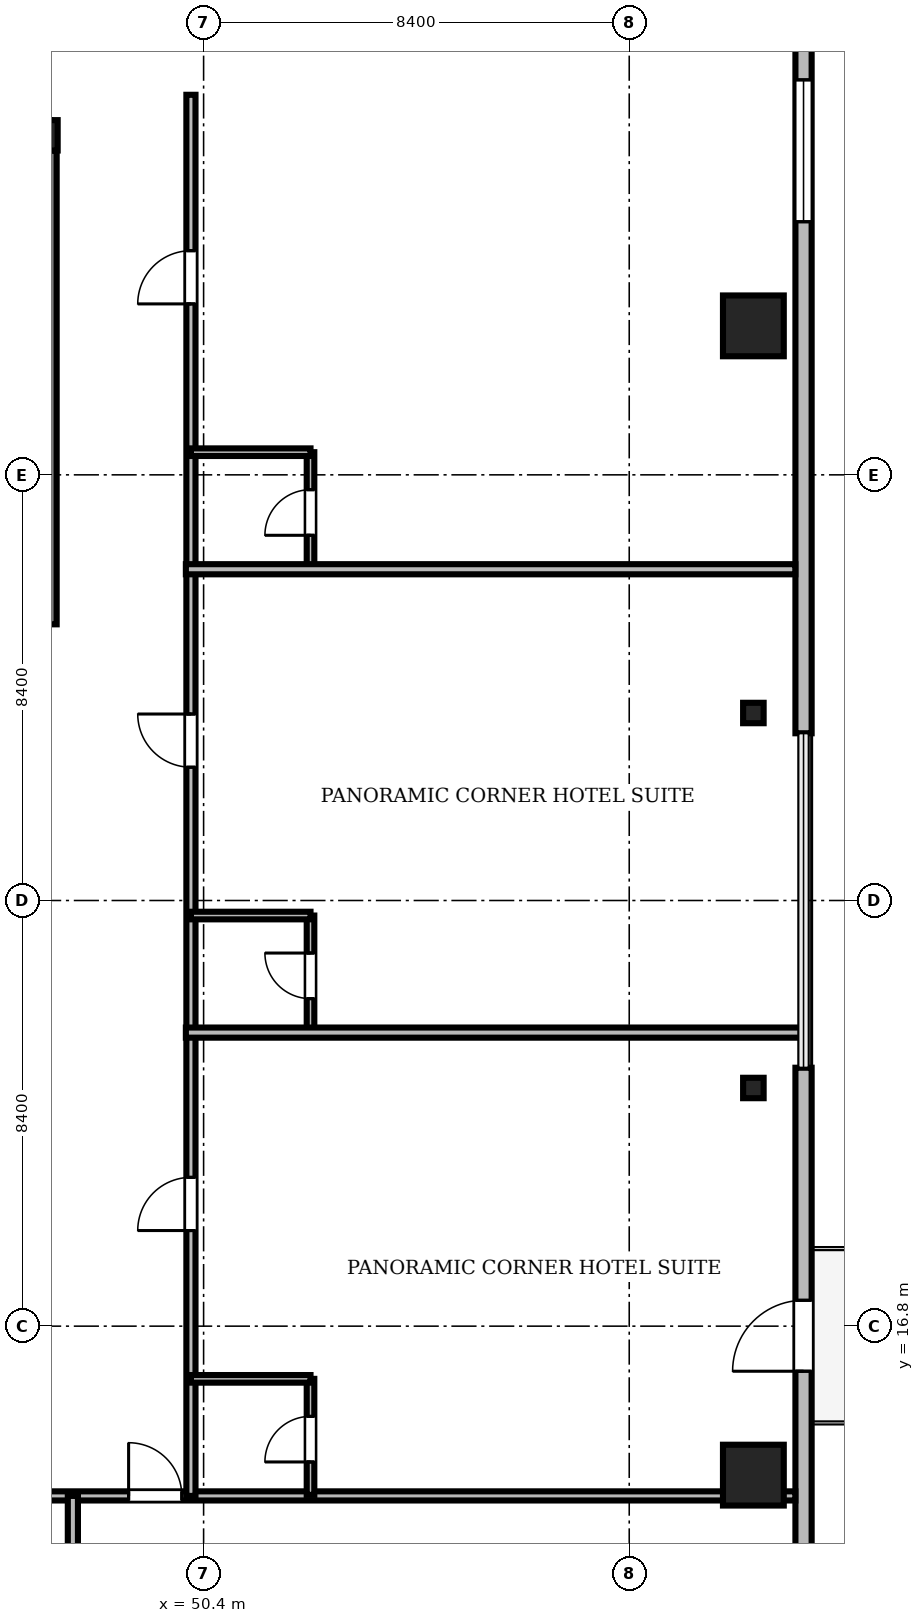
"""IFC4 building model, lengths in metres.
Left out: names, types, materials, properties, quantities, classifications, styles, units other than length and angle.
Written with IfcOpenShell. Run it as: python <this file> out.ifc"""

import sys

from ifc_helpers import new_model, si_unit, direction, frame, frame_2d, origin, origin_2d, place, context, subcontext, project, spatial, rectangle, i_section, extrude, source, transform, mapped, element, fill, save


model = new_model("IFC4")
c1 = context("Model", 3, precision=1e-05, world=origin(), true_north=direction((0.0, 1.0)))
c2 = subcontext(c1, "Body", "Model", "MODEL_VIEW")
j1 = project(units=[si_unit("LENGTHUNIT", "METRE"), si_unit("PLANEANGLEUNIT", "RADIAN")], contexts=[c1])
p1 = place(None, origin())
s1 = spatial("IfcSite", under=j1, at=p1, CompositionType="ELEMENT")
p2 = place(p1, origin())
s2 = spatial("IfcBuilding", under=s1, at=p2, CompositionType="ELEMENT")
p3 = place(p2, frame((0.0, 0.0, 242.7)))
s3 = spatial("IfcBuildingStorey", under=s2, at=p3, CompositionType="ELEMENT", Elevation=242.7)
m1 = source(origin(), c2, "Body", "SweptSolid", [
    extrude(i_section(OverallWidth=0.3, OverallDepth=0.6, WebThickness=0.015, FlangeThickness=0.03, FilletRadius=0.027, at=origin_2d()), origin(), (0.0, 0.0, 1.0), 3.73),
])
p4 = place(p3, frame((47.37, 40.3, 0.0), z_axis=(0.0, 0.0, 1.0), x_axis=(1.0, 0.0, 0.0)))
e1 = element("IfcColumn", 1, at=p4, inside=s3, PredefinedType="COLUMN", context=c2, shape_type="MappedRepresentation", body=[
    mapped(m1, transform((0.0, 0.0, 0.0), scale=1.0)),
])
m2 = source(origin(), c2, "Body", "SweptSolid", [
    extrude(rectangle(XDim=1.2, YDim=1.2, at=origin_2d()), origin(), (0.0, 0.0, 1.0), 3.73),
])
for number, where, z_axis, x_axis in (
    (2, (61.25, 13.86, 0.0), (0.0, 0.0, 1.0), (1.0, 0.0, 0.0)),
    (3, (61.25, 36.54, 0.0), (0.0, 0.0, 1.0), (1.0, 0.0, 0.0)),
):
    element("IfcColumn", number, at=place(p3, frame(where, z_axis=z_axis, x_axis=x_axis)), inside=s3, PredefinedType="COLUMN", context=c2, shape_type="MappedRepresentation", body=[
        mapped(m2, transform((0.0, 0.0, 0.0), scale=1.0)),
    ])
m3 = source(origin(), c2, "Body", "SweptSolid", [
    extrude(i_section(OverallWidth=0.405, OverallDepth=0.403, WebThickness=0.018, FlangeThickness=0.028, FilletRadius=0.015, at=origin_2d()), origin(), (0.0, 0.0, 1.0), 3.73),
])
for number, where, z_axis, x_axis in (
    (4, (61.25, 21.5, 0.0), (0.0, 0.0, 1.0), (1.0, 0.0, 0.0)),
    (5, (61.25, 28.9, 0.0), (0.0, 0.0, 1.0), (1.0, 0.0, 0.0)),
):
    element("IfcColumn", number, at=place(p3, frame(where, z_axis=z_axis, x_axis=x_axis)), inside=s3, PredefinedType="COLUMN", context=c2, shape_type="MappedRepresentation", body=[
        mapped(m3, transform((0.0, 0.0, 0.0), scale=1.0)),
    ])
m4 = source(origin(), c2, "Body", "SweptSolid", [
    extrude(rectangle(XDim=15.6, YDim=0.32, at=frame_2d((7.8, 0.0))), origin(), (0.0, 0.0, 1.0), 3.73),
])
p5 = place(p3, frame((62.24, 6.3, 0.0), z_axis=(0.0, 0.0, 1.0), x_axis=(0.0, 1.0, 0.0)))
e6 = element("IfcWall", 6, at=p5, inside=s3, PredefinedType="SOLIDWALL", context=c2, shape_type="MappedRepresentation", body=[
    mapped(m4, transform((0.0, 0.0, 0.0), scale=1.0)),
])
m5 = source(origin(), c2, "Body", "SweptSolid", [
    extrude(rectangle(XDim=1.4, YDim=2.3, at=frame_2d((0.7, 1.15))), frame((0.0, 0.17, 0.0), z_axis=(0.0, -1.0, 0.0), x_axis=(1.0, 0.0, 0.0)), (0.0, 0.0, 1.0), 0.34),
])
p6 = place(p5, frame((9.61, 0.0, 0.0)))
e7 = element("IfcOpeningElement", 7, at=p6, cuts=e6, PredefinedType="OPENING", context=c2, shape_type="MappedRepresentation", body=[
    mapped(m5, transform((0.0, 0.0, 0.0), scale=1.0)),
])
m6 = source(origin(), c2, "Body", "SweptSolid", [
    extrude(rectangle(XDim=2.8, YDim=2.4, at=frame_2d((1.4, 1.2))), frame((0.0, 0.17, 0.0), z_axis=(0.0, -1.0, 0.0), x_axis=(1.0, 0.0, 0.0)), (0.0, 0.0, 1.0), 0.34),
])
p7 = place(p5, frame((2.705, 0.0, 0.72)))
e8 = element("IfcOpeningElement", 8, at=p7, cuts=e6, PredefinedType="OPENING", context=c2, shape_type="MappedRepresentation", body=[
    mapped(m6, transform((0.0, 0.0, 0.0), scale=1.0)),
])
m7 = source(origin(), c2, "Body", "SweptSolid", [
    extrude(rectangle(XDim=15.6, YDim=0.32, at=frame_2d((7.8, 0.0))), origin(), (0.0, 0.0, 1.0), 3.73),
])
p8 = place(p3, frame((62.24, 28.5, 0.0), z_axis=(0.0, 0.0, 1.0), x_axis=(0.0, 1.0, 0.0)))
e9 = element("IfcWall", 9, at=p8, inside=s3, PredefinedType="SOLIDWALL", context=c2, shape_type="MappedRepresentation", body=[
    mapped(m7, transform((0.0, 0.0, 0.0), scale=1.0)),
])
p9 = place(p8, frame((10.095, 0.0, 0.72)))
e10 = element("IfcOpeningElement", 10, at=p9, cuts=e9, PredefinedType="OPENING", context=c2, shape_type="MappedRepresentation", body=[
    mapped(m6, transform((0.0, 0.0, 0.0), scale=1.0)),
])
m8 = source(origin(), c2, "Body", "SweptSolid", [
    extrude(rectangle(XDim=9.35, YDim=0.25, at=frame_2d((4.675, 0.0))), origin(), (0.0, 0.0, 1.0), 3.75),
])
p10 = place(p3, frame((47.375, 30.65, 0.0), z_axis=(0.0, 0.0, 1.0), x_axis=(0.0, 1.0, 0.0)))
e11 = element("IfcWall", 11, at=p10, inside=s3, PredefinedType="SOLIDWALL", context=c2, shape_type="MappedRepresentation", body=[
    mapped(m8, transform((0.0, 0.0, 0.0), scale=1.0)),
])
m9 = source(origin(), c2, "Body", "SweptSolid", [
    extrude(rectangle(XDim=46.156, YDim=0.18, at=frame_2d((23.078, 0.0))), origin(), (0.0, 0.0, 1.0), 2.972),
])
p11 = place(p3, frame((15.922, 13.45, 0.0), z_axis=(0.0, 0.0, 1.0), x_axis=(1.0, 0.0, 0.0)))
e12 = element("IfcWall", 12, at=p11, inside=s3, PredefinedType="PARTITIONING", context=c2, shape_type="MappedRepresentation", body=[
    mapped(m9, transform((0.0, 0.0, 0.0), scale=1.0)),
])
m10 = source(origin(), c2, "Body", "SweptSolid", [
    extrude(rectangle(XDim=1.05, YDim=2.2, at=frame_2d((0.525, 1.1))), frame((0.0, 0.1, 0.0), z_axis=(0.0, -1.0, 0.0), x_axis=(1.0, 0.0, 0.0)), (0.0, 0.0, 1.0), 0.2),
])
p12 = place(p11, frame((5.264, 0.0, 0.0)))
e13 = element("IfcOpeningElement", 13, at=p12, cuts=e12, PredefinedType="OPENING", context=c2, shape_type="MappedRepresentation", body=[
    mapped(m10, transform((0.0, 0.0, 0.0), scale=1.0)),
])
p13 = place(p11, frame((7.872, 0.0, 0.0)))
e14 = element("IfcOpeningElement", 14, at=p13, cuts=e12, PredefinedType="OPENING", context=c2, shape_type="MappedRepresentation", body=[
    mapped(m10, transform((0.0, 0.0, 0.0), scale=1.0)),
])
p14 = place(p11, frame((12.409, 0.0, 0.0)))
e15 = element("IfcOpeningElement", 15, at=p14, cuts=e12, PredefinedType="OPENING", context=c2, shape_type="MappedRepresentation", body=[
    mapped(m10, transform((0.0, 0.0, 0.0), scale=1.0)),
])
m11 = source(origin(), c2, "Body", "SweptSolid", [
    extrude(rectangle(XDim=0.95, YDim=2.15, at=frame_2d((0.475, 1.075))), frame((0.0, 0.1, 0.0), z_axis=(0.0, -1.0, 0.0), x_axis=(1.0, 0.0, 0.0)), (0.0, 0.0, 1.0), 0.2),
])
p15 = place(p11, frame((18.691, 0.0, 0.0)))
e16 = element("IfcOpeningElement", 16, at=p15, cuts=e12, PredefinedType="OPENING", context=c2, shape_type="MappedRepresentation", body=[
    mapped(m11, transform((0.0, 0.0, 0.0), scale=1.0)),
])
p16 = place(p11, frame((23.518, 0.0, 0.0)))
e17 = element("IfcOpeningElement", 17, at=p16, cuts=e12, PredefinedType="OPENING", context=c2, shape_type="MappedRepresentation", body=[
    mapped(m11, transform((0.0, 0.0, 0.0), scale=1.0)),
])
p17 = place(p11, frame((28.1, 0.0, 0.0)))
e18 = element("IfcOpeningElement", 18, at=p17, cuts=e12, PredefinedType="OPENING", context=c2, shape_type="MappedRepresentation", body=[
    mapped(m10, transform((0.0, 0.0, 0.0), scale=1.0)),
])
p18 = place(p11, frame((32.998, 0.0, 0.0)))
e19 = element("IfcOpeningElement", 19, at=p18, cuts=e12, PredefinedType="OPENING", context=c2, shape_type="MappedRepresentation", body=[
    mapped(m10, transform((0.0, 0.0, 0.0), scale=1.0)),
])
m12 = source(origin(), c2, "Body", "SweptSolid", [
    extrude(rectangle(XDim=27.65, YDim=0.18, at=frame_2d((13.825, 0.0))), origin(), (0.0, 0.0, 1.0), 3.172),
])
p19 = place(p3, frame((50.15, 13.45, 0.0), z_axis=(0.0, 0.0, 1.0), x_axis=(0.0, 1.0, 0.0)))
e20 = element("IfcWall", 20, at=p19, inside=s3, PredefinedType="PARTITIONING", context=c2, shape_type="MappedRepresentation", body=[
    mapped(m12, transform((0.0, 0.0, 0.0), scale=1.0)),
])
p20 = place(p19, frame((5.237, 0.0, 0.0)))
e21 = element("IfcOpeningElement", 21, at=p20, cuts=e20, PredefinedType="OPENING", context=c2, shape_type="MappedRepresentation", body=[
    mapped(m10, transform((0.0, 0.0, 0.0), scale=1.0)),
])
p21 = place(p19, frame((14.38, 0.0, 0.0)))
e22 = element("IfcOpeningElement", 22, at=p21, cuts=e20, PredefinedType="OPENING", context=c2, shape_type="MappedRepresentation", body=[
    mapped(m10, transform((0.0, 0.0, 0.0), scale=1.0)),
])
p22 = place(p19, frame((23.523, 0.0, 0.0)))
e23 = element("IfcOpeningElement", 23, at=p22, cuts=e20, PredefinedType="OPENING", context=c2, shape_type="MappedRepresentation", body=[
    mapped(m10, transform((0.0, 0.0, 0.0), scale=1.0)),
])
m13 = source(origin(), c2, "Body", "SweptSolid", [
    extrude(rectangle(XDim=2.29, YDim=0.15, at=frame_2d((1.145, 0.0))), origin(), (0.0, 0.0, 1.0), 3.172),
])
p23 = place(p3, frame((52.51, 13.47, 0.0), z_axis=(0.0, 0.0, 1.0), x_axis=(0.0, 1.0, 0.0)))
e24 = element("IfcWall", 24, at=p23, inside=s3, PredefinedType="PARTITIONING", context=c2, shape_type="MappedRepresentation", body=[
    mapped(m13, transform((0.0, 0.0, 0.0), scale=1.0)),
])
m14 = source(origin(), c2, "Body", "SweptSolid", [
    extrude(rectangle(XDim=0.9, YDim=2.1, at=frame_2d((0.45, 1.05))), frame((0.0, 0.085, 0.0), z_axis=(0.0, -1.0, 0.0), x_axis=(1.0, 0.0, 0.0)), (0.0, 0.0, 1.0), 0.17),
])
p24 = place(p23, frame((0.65, 0.0, 0.0)))
e25 = element("IfcOpeningElement", 25, at=p24, cuts=e24, PredefinedType="OPENING", context=c2, shape_type="MappedRepresentation", body=[
    mapped(m14, transform((0.0, 0.0, 0.0), scale=1.0)),
])
m15 = source(origin(), c2, "Body", "SweptSolid", [
    extrude(rectangle(XDim=2.29, YDim=0.15, at=frame_2d((1.145, 0.0))), origin(), (0.0, 0.0, 1.0), 3.422),
])
p25 = place(p3, frame((52.51, 22.613, 0.0), z_axis=(0.0, 0.0, 1.0), x_axis=(0.0, 1.0, 0.0)))
e26 = element("IfcWall", 26, at=p25, inside=s3, PredefinedType="PARTITIONING", context=c2, shape_type="MappedRepresentation", body=[
    mapped(m15, transform((0.0, 0.0, 0.0), scale=1.0)),
])
p26 = place(p25, frame((0.65, 0.0, 0.0)))
e27 = element("IfcOpeningElement", 27, at=p26, cuts=e26, PredefinedType="OPENING", context=c2, shape_type="MappedRepresentation", body=[
    mapped(m14, transform((0.0, 0.0, 0.0), scale=1.0)),
])
m16 = source(origin(), c2, "Body", "SweptSolid", [
    extrude(rectangle(XDim=2.29, YDim=0.15, at=frame_2d((1.145, 0.0))), origin(), (0.0, 0.0, 1.0), 3.73),
])
p27 = place(p3, frame((52.51, 31.757, 0.0), z_axis=(0.0, 0.0, 1.0), x_axis=(0.0, 1.0, 0.0)))
e28 = element("IfcWall", 28, at=p27, inside=s3, PredefinedType="PARTITIONING", context=c2, shape_type="MappedRepresentation", body=[
    mapped(m16, transform((0.0, 0.0, 0.0), scale=1.0)),
])
p28 = place(p27, frame((0.65, 0.0, 0.0)))
e29 = element("IfcOpeningElement", 29, at=p28, cuts=e28, PredefinedType="OPENING", context=c2, shape_type="MappedRepresentation", body=[
    mapped(m14, transform((0.0, 0.0, 0.0), scale=1.0)),
])
m17 = source(origin(), c2, "Body", "SweptSolid", [
    extrude(rectangle(XDim=12.22, YDim=0.2, at=frame_2d((6.11, 0.0))), origin(), (0.0, 0.0, 1.0), 2.972),
])
p29 = place(p3, frame((50.05, 22.593, 0.0), z_axis=(0.0, 0.0, 1.0), x_axis=(1.0, 0.0, 0.0)))
e30 = element("IfcWall", 30, at=p29, inside=s3, PredefinedType="PARTITIONING", context=c2, shape_type="MappedRepresentation", body=[
    mapped(m17, transform((0.0, 0.0, 0.0), scale=1.0)),
])
m18 = source(origin(), c2, "Body", "SweptSolid", [
    extrude(rectangle(XDim=12.028, YDim=0.2, at=frame_2d((6.014, 0.0))), origin(), (0.0, 0.0, 1.0), 2.972),
])
p30 = place(p3, frame((50.05, 31.737, 0.0), z_axis=(0.0, 0.0, 1.0), x_axis=(1.0, 0.0, 0.0)))
e31 = element("IfcWall", 31, at=p30, inside=s3, PredefinedType="PARTITIONING", context=c2, shape_type="MappedRepresentation", body=[
    mapped(m18, transform((0.0, 0.0, 0.0), scale=1.0)),
])
m19 = source(origin(), c2, "Body", "SweptSolid", [
    extrude(rectangle(XDim=11.328, YDim=0.2, at=frame_2d((5.664, 0.0))), origin(), (0.0, 0.0, 1.0), 2.972),
])
p31 = place(p3, frame((47.82, 2.122, 0.0), z_axis=(0.0, 0.0, 1.0), x_axis=(0.0, 1.0, 0.0)))
e32 = element("IfcWall", 32, at=p31, inside=s3, PredefinedType="PARTITIONING", context=c2, shape_type="MappedRepresentation", body=[
    mapped(m19, transform((0.0, 0.0, 0.0), scale=1.0)),
])
m20 = source(origin(), c2, "Body", "SweptSolid", [
    extrude(rectangle(XDim=2.36, YDim=0.15, at=frame_2d((1.18, 0.0))), origin(), (0.0, 0.0, 1.0), 3.73),
])
for number, where, z_axis, x_axis in (
    (33, (50.15, 15.76, 0.0), (0.0, 0.0, 1.0), (1.0, 0.0, 0.0)),
    (34, (50.15, 24.903, 0.0), (0.0, 0.0, 1.0), (1.0, 0.0, 0.0)),
    (35, (50.15, 34.047, 0.0), (0.0, 0.0, 1.0), (1.0, 0.0, 0.0)),
):
    element("IfcWall", number, at=place(p3, frame(where, z_axis=z_axis, x_axis=x_axis)), inside=s3, PredefinedType="PARTITIONING", context=c2, shape_type="MappedRepresentation", body=[
        mapped(m20, transform((0.0, 0.0, 0.0), scale=1.0)),
    ])
m21 = source(origin(), c2, "Body", "SweptSolid", [
    extrude(rectangle(XDim=1.4, YDim=2.3, at=frame_2d((0.7, 1.15))), frame((0.0, 0.025, 0.0), z_axis=(0.0, -1.0, 0.0), x_axis=(1.0, 0.0, 0.0)), (0.0, 0.0, 1.0), 0.05),
])
p32 = place(p6, frame((1.4, 0.0, 0.0), z_axis=(0.0, 0.0, 1.0), x_axis=(-1.0, 0.0, 0.0)))
e36 = element("IfcDoor", 36, at=p32, inside=s3, OperationType="DOUBLE_DOOR_SLIDING", PredefinedType="DOOR", context=c2, shape_type="MappedRepresentation", body=[
    mapped(m21, transform((0.0, 0.0, 0.0), scale=1.0)),
])
fill(e7, e36)
m22 = source(origin(), c2, "Body", "SweptSolid", [
    extrude(rectangle(XDim=2.8, YDim=2.4, at=frame_2d((1.4, 1.2))), frame((0.0, 0.03, 0.0), z_axis=(0.0, -1.0, 0.0), x_axis=(1.0, 0.0, 0.0)), (0.0, 0.0, 1.0), 0.06),
])
p33 = place(p9, origin())
e37 = element("IfcWindow", 37, at=p33, inside=s3, PartitioningType="SINGLE_PANEL", PredefinedType="WINDOW", context=c2, shape_type="MappedRepresentation", body=[
    mapped(m22, transform((0.0, 0.0, 0.0), scale=1.0)),
])
fill(e10, e37)
m23 = source(origin(), c2, "Body", "SweptSolid", [
    extrude(rectangle(XDim=1.05, YDim=2.2, at=frame_2d((0.525, 1.1))), frame((0.0, 0.025, 0.0), z_axis=(0.0, -1.0, 0.0), x_axis=(1.0, 0.0, 0.0)), (0.0, 0.0, 1.0), 0.05),
])
p34 = place(p18, origin())
e38 = element("IfcDoor", 38, at=p34, inside=s3, OperationType="SINGLE_SWING_LEFT", PredefinedType="DOOR", context=c2, shape_type="MappedRepresentation", body=[
    mapped(m23, transform((0.0, 0.0, 0.0), scale=1.0)),
])
fill(e19, e38)
p35 = place(p20, origin())
e39 = element("IfcDoor", 39, at=p35, inside=s3, OperationType="SINGLE_SWING_LEFT", PredefinedType="DOOR", context=c2, shape_type="MappedRepresentation", body=[
    mapped(m23, transform((0.0, 0.0, 0.0), scale=1.0)),
])
fill(e21, e39)
p36 = place(p21, origin())
e40 = element("IfcDoor", 40, at=p36, inside=s3, OperationType="SINGLE_SWING_RIGHT", PredefinedType="DOOR", context=c2, shape_type="MappedRepresentation", body=[
    mapped(m23, transform((0.0, 0.0, 0.0), scale=1.0)),
])
fill(e22, e40)
p37 = place(p22, origin())
e41 = element("IfcDoor", 41, at=p37, inside=s3, OperationType="SINGLE_SWING_LEFT", PredefinedType="DOOR", context=c2, shape_type="MappedRepresentation", body=[
    mapped(m23, transform((0.0, 0.0, 0.0), scale=1.0)),
])
fill(e23, e41)
m24 = source(origin(), c2, "Body", "SweptSolid", [
    extrude(rectangle(XDim=0.9, YDim=2.1, at=frame_2d((0.45, 1.05))), frame((0.0, 0.025, 0.0), z_axis=(0.0, -1.0, 0.0), x_axis=(1.0, 0.0, 0.0)), (0.0, 0.0, 1.0), 0.05),
])
p38 = place(p24, origin())
e42 = element("IfcDoor", 42, at=p38, inside=s3, OperationType="SINGLE_SWING_LEFT", PredefinedType="DOOR", context=c2, shape_type="MappedRepresentation", body=[
    mapped(m24, transform((0.0, 0.0, 0.0), scale=1.0)),
])
fill(e25, e42)
p39 = place(p26, origin())
e43 = element("IfcDoor", 43, at=p39, inside=s3, OperationType="SINGLE_SWING_RIGHT", PredefinedType="DOOR", context=c2, shape_type="MappedRepresentation", body=[
    mapped(m24, transform((0.0, 0.0, 0.0), scale=1.0)),
])
fill(e27, e43)
p40 = place(p28, origin())
e44 = element("IfcDoor", 44, at=p40, inside=s3, OperationType="SINGLE_SWING_LEFT", PredefinedType="DOOR", context=c2, shape_type="MappedRepresentation", body=[
    mapped(m24, transform((0.0, 0.0, 0.0), scale=1.0)),
])
fill(e29, e44)
save(model, sys.argv[1])
